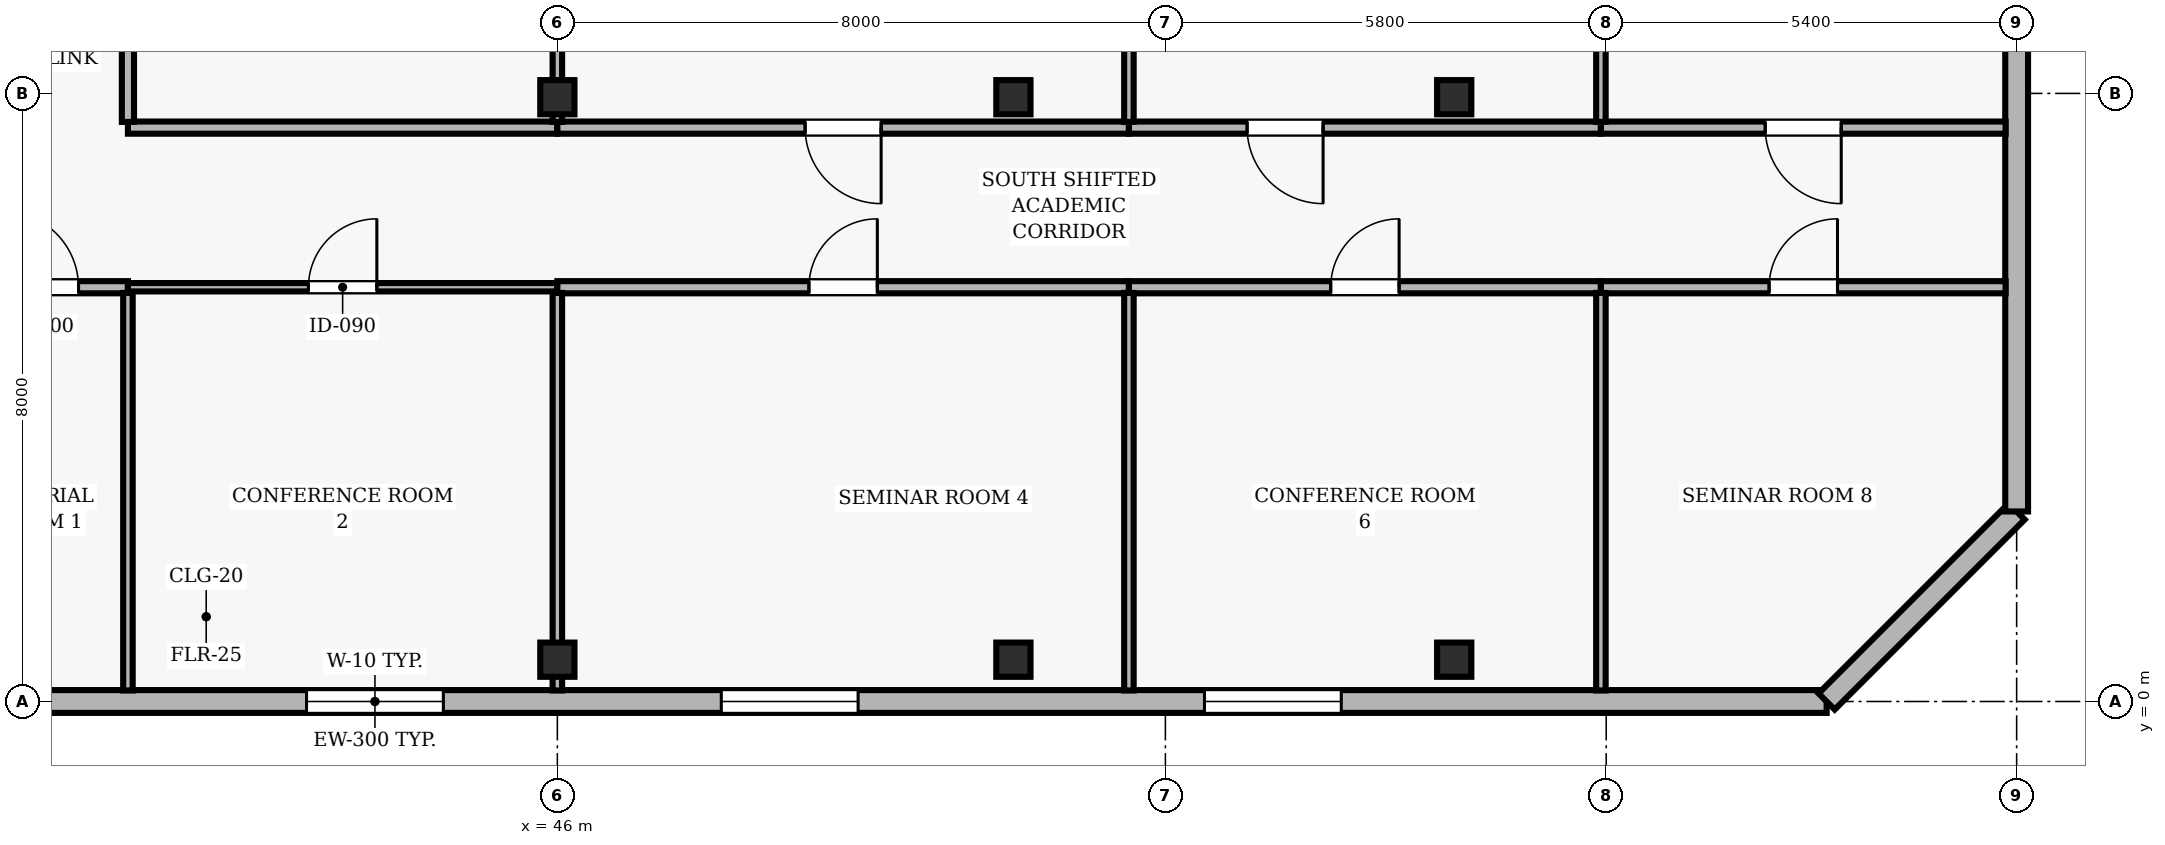
"""IFC4 building model, lengths in metres.
Left out: names, types, materials, properties, quantities, classifications, styles, units other than length and angle.
Written with IfcOpenShell. Run it as: python <this file> out.ifc"""

import sys

from ifc_helpers import new_model, si_unit, direction, frame, frame_2d, origin, origin_2d, place, context, subcontext, project, spatial, rectangle, hollow_rectangle, extrude, element, fill, save


model = new_model("IFC4")
c1 = context("Model", 3, precision=1e-05, world=origin(), true_north=direction((0.0, 1.0)))
c2 = subcontext(c1, "Body", "Model", "MODEL_VIEW")
j1 = project(units=[si_unit("LENGTHUNIT", "METRE"), si_unit("PLANEANGLEUNIT", "RADIAN")], contexts=[c1])
p1 = place(None, origin())
s1 = spatial("IfcSite", under=j1, at=p1, CompositionType="ELEMENT")
p2 = place(p1, origin())
s2 = spatial("IfcBuilding", under=s1, at=p2, CompositionType="ELEMENT")
p3 = place(p2, frame((0.0, 0.0, 234.3)))
s3 = spatial("IfcBuildingStorey", under=s2, at=p3, CompositionType="ELEMENT", Elevation=234.3)
for number, where, z_axis, x_axis in (
    (1, (46.0, 0.55, 0.0), (0.0, 0.0, 1.0), (1.0, 0.0, 0.0)),
    (2, (46.0, 7.95, 0.0), (0.0, 0.0, 1.0), (1.0, 0.0, 0.0)),
    (3, (52.0, 0.55, 0.0), (0.0, 0.0, 1.0), (1.0, 0.0, 0.0)),
    (4, (52.0, 7.95, 0.0), (0.0, 0.0, 1.0), (1.0, 0.0, 0.0)),
    (5, (57.8, 0.55, 0.0), (0.0, 0.0, 1.0), (1.0, 0.0, 0.0)),
    (6, (57.8, 7.95, 0.0), (0.0, 0.0, 1.0), (1.0, 0.0, 0.0)),
):
    element("IfcColumn", number, at=place(p3, frame(where, z_axis=z_axis, x_axis=x_axis)), inside=s3, PredefinedType="COLUMN", context=c2, shape_type="SweptSolid", body=[
        extrude(hollow_rectangle(XDim=0.45, YDim=0.45, WallThickness=0.02, at=origin_2d()), origin(), (0.0, 0.0, 1.0), 3.9),
    ])
p4 = place(p3, frame((24.5, 0.0, 0.0), z_axis=(0.0, 0.0, 1.0), x_axis=(1.0, 0.0, 0.0)))
e7 = element("IfcWall", 7, at=p4, inside=s3, PredefinedType="SOLIDWALL", context=c2, shape_type="SweptSolid", body=[
    extrude(rectangle(XDim=38.2, YDim=0.3, at=frame_2d((19.1, 0.0))), origin(), (0.0, 0.0, 1.0), 3.64),
])
p5 = place(p4, frame((1.829, 0.0, 0.9)))
e8 = element("IfcOpeningElement", 8, at=p5, cuts=e7, PredefinedType="OPENING", context=c2, shape_type="SweptSolid", body=[
    extrude(rectangle(XDim=1.8, YDim=2.2, at=frame_2d((0.9, 1.1))), frame((0.0, 0.16, 0.0), z_axis=(0.0, -1.0, 0.0), x_axis=(1.0, 0.0, 0.0)), (0.0, 0.0, 1.0), 0.32),
])
p6 = place(p4, frame((8.186, 0.0, 0.9)))
e9 = element("IfcOpeningElement", 9, at=p6, cuts=e7, PredefinedType="OPENING", context=c2, shape_type="SweptSolid", body=[
    extrude(rectangle(XDim=1.8, YDim=2.2, at=frame_2d((0.9, 1.1))), frame((0.0, 0.16, 0.0), z_axis=(0.0, -1.0, 0.0), x_axis=(1.0, 0.0, 0.0)), (0.0, 0.0, 1.0), 0.32),
])
p7 = place(p4, frame((18.2, 0.0, 0.9)))
e10 = element("IfcOpeningElement", 10, at=p7, cuts=e7, PredefinedType="OPENING", context=c2, shape_type="SweptSolid", body=[
    extrude(rectangle(XDim=1.8, YDim=2.2, at=frame_2d((0.9, 1.1))), frame((0.0, 0.16, 0.0), z_axis=(0.0, -1.0, 0.0), x_axis=(1.0, 0.0, 0.0)), (0.0, 0.0, 1.0), 0.32),
])
p8 = place(p4, frame((23.657, 0.0, 0.9)))
e11 = element("IfcOpeningElement", 11, at=p8, cuts=e7, PredefinedType="OPENING", context=c2, shape_type="SweptSolid", body=[
    extrude(rectangle(XDim=1.8, YDim=2.2, at=frame_2d((0.9, 1.1))), frame((0.0, 0.16, 0.0), z_axis=(0.0, -1.0, 0.0), x_axis=(1.0, 0.0, 0.0)), (0.0, 0.0, 1.0), 0.32),
])
p9 = place(p4, frame((30.014, 0.0, 0.9)))
e12 = element("IfcOpeningElement", 12, at=p9, cuts=e7, PredefinedType="OPENING", context=c2, shape_type="SweptSolid", body=[
    extrude(rectangle(XDim=1.8, YDim=2.2, at=frame_2d((0.9, 1.1))), frame((0.0, 0.16, 0.0), z_axis=(0.0, -1.0, 0.0), x_axis=(1.0, 0.0, 0.0)), (0.0, 0.0, 1.0), 0.32),
])
p10 = place(p3, frame((62.7, 0.0, 0.0), z_axis=(0.0, 0.0, 1.0), x_axis=(0.707106781187, 0.707106781187, 0.0)))
e13 = element("IfcWall", 13, at=p10, inside=s3, PredefinedType="SOLIDWALL", context=c2, shape_type="SweptSolid", body=[
    extrude(rectangle(XDim=3.536, YDim=0.3, at=frame_2d((1.768, 0.0))), origin(), (0.0, 0.0, 1.0), 3.64),
])
p11 = place(p3, frame((65.2, 2.5, 0.0), z_axis=(0.0, 0.0, 1.0), x_axis=(0.0, 1.0, 0.0)))
e14 = element("IfcWall", 14, at=p11, inside=s3, PredefinedType="SOLIDWALL", context=c2, shape_type="SweptSolid", body=[
    extrude(rectangle(XDim=11.0, YDim=0.3, at=frame_2d((5.5, 0.0))), origin(), (0.0, 0.0, 1.0), 3.64),
])
p12 = place(p11, frame((6.75, 0.0, 0.9)))
e15 = element("IfcOpeningElement", 15, at=p12, cuts=e14, PredefinedType="OPENING", context=c2, shape_type="SweptSolid", body=[
    extrude(rectangle(XDim=3.0, YDim=2.2, at=frame_2d((1.5, 1.1))), frame((0.0, 0.16, 0.0), z_axis=(0.0, -1.0, 0.0), x_axis=(1.0, 0.0, 0.0)), (0.0, 0.0, 1.0), 0.32),
])
p13 = place(p3, frame((38.05, 5.45, 0.0), z_axis=(0.0, 0.0, 1.0), x_axis=(1.0, 0.0, 0.0)))
e16 = element("IfcWall", 16, at=p13, inside=s3, PredefinedType="PARTITIONING", context=c2, shape_type="SweptSolid", body=[
    extrude(rectangle(XDim=2.3, YDim=0.16, at=frame_2d((1.15, 0.0))), origin(), (0.0, 0.0, 1.0), 3.322),
])
p14 = place(p13, frame((0.65, 0.0, 0.0)))
e17 = element("IfcOpeningElement", 17, at=p14, cuts=e16, PredefinedType="OPENING", context=c2, shape_type="SweptSolid", body=[
    extrude(rectangle(XDim=1.0, YDim=2.1, at=frame_2d((0.5, 1.05))), frame((0.0, 0.09, 0.0), z_axis=(0.0, -1.0, 0.0), x_axis=(1.0, 0.0, 0.0)), (0.0, 0.0, 1.0), 0.18),
])
p15 = place(p3, frame((40.35, 5.45, 0.0), z_axis=(0.0, 0.0, 1.0), x_axis=(1.0, 0.0, 0.0)))
e18 = element("IfcWall", 18, at=p15, inside=s3, PredefinedType="MOVABLE", context=c2, shape_type="SweptSolid", body=[
    extrude(rectangle(XDim=5.65, YDim=0.11, at=frame_2d((2.825, 0.0))), origin(), (0.0, 0.0, 1.0), 3.322),
])
p16 = place(p15, frame((2.375, 0.0, 0.0)))
e19 = element("IfcOpeningElement", 19, at=p16, cuts=e18, PredefinedType="OPENING", context=c2, shape_type="SweptSolid", body=[
    extrude(rectangle(XDim=0.9, YDim=2.1, at=frame_2d((0.45, 1.05))), frame((0.0, 0.065, 0.0), z_axis=(0.0, -1.0, 0.0), x_axis=(1.0, 0.0, 0.0)), (0.0, 0.0, 1.0), 0.13),
])
p17 = place(p3, frame((46.0, 5.45, 0.0), z_axis=(0.0, 0.0, 1.0), x_axis=(1.0, 0.0, 0.0)))
e20 = element("IfcWall", 20, at=p17, inside=s3, PredefinedType="PARTITIONING", context=c2, shape_type="SweptSolid", body=[
    extrude(rectangle(XDim=7.52, YDim=0.16, at=frame_2d((3.76, 0.0))), origin(), (0.0, 0.0, 1.0), 3.322),
])
p18 = place(p17, frame((3.31, 0.0, 0.0)))
e21 = element("IfcOpeningElement", 21, at=p18, cuts=e20, PredefinedType="OPENING", context=c2, shape_type="SweptSolid", body=[
    extrude(rectangle(XDim=0.9, YDim=2.1, at=frame_2d((0.45, 1.05))), frame((0.0, 0.09, 0.0), z_axis=(0.0, -1.0, 0.0), x_axis=(1.0, 0.0, 0.0)), (0.0, 0.0, 1.0), 0.18),
])
p19 = place(p3, frame((46.0, 7.55, 0.0), z_axis=(0.0, 0.0, 1.0), x_axis=(-1.0, 0.0, 0.0)))
e22 = element("IfcWall", 22, at=p19, inside=s3, PredefinedType="PARTITIONING", context=c2, shape_type="SweptSolid", body=[
    extrude(rectangle(XDim=5.65, YDim=0.16, at=frame_2d((2.825, 0.0))), origin(), (0.0, 0.0, 1.0), 3.096),
])
p20 = place(p3, frame((53.52, 5.45, 0.0), z_axis=(0.0, 0.0, 1.0), x_axis=(1.0, 0.0, 0.0)))
e23 = element("IfcWall", 23, at=p20, inside=s3, PredefinedType="PARTITIONING", context=c2, shape_type="SweptSolid", body=[
    extrude(rectangle(XDim=6.21, YDim=0.16, at=frame_2d((3.105, 0.0))), origin(), (0.0, 0.0, 1.0), 3.322),
])
p21 = place(p20, frame((2.655, 0.0, 0.0)))
e24 = element("IfcOpeningElement", 24, at=p21, cuts=e23, PredefinedType="OPENING", context=c2, shape_type="SweptSolid", body=[
    extrude(rectangle(XDim=0.9, YDim=2.1, at=frame_2d((0.45, 1.05))), frame((0.0, 0.09, 0.0), z_axis=(0.0, -1.0, 0.0), x_axis=(1.0, 0.0, 0.0)), (0.0, 0.0, 1.0), 0.18),
])
p22 = place(p3, frame((53.52, 7.55, 0.0), z_axis=(0.0, 0.0, 1.0), x_axis=(-1.0, 0.0, 0.0)))
e25 = element("IfcWall", 25, at=p22, inside=s3, PredefinedType="PARTITIONING", context=c2, shape_type="SweptSolid", body=[
    extrude(rectangle(XDim=7.52, YDim=0.16, at=frame_2d((3.76, 0.0))), origin(), (0.0, 0.0, 1.0), 3.096),
])
p23 = place(p22, frame((3.26, 0.0, 0.0)))
e26 = element("IfcOpeningElement", 26, at=p23, cuts=e25, PredefinedType="OPENING", context=c2, shape_type="SweptSolid", body=[
    extrude(rectangle(XDim=1.0, YDim=2.1, at=frame_2d((0.5, 1.05))), frame((0.0, 0.09, 0.0), z_axis=(0.0, -1.0, 0.0), x_axis=(1.0, 0.0, 0.0)), (0.0, 0.0, 1.0), 0.18),
])
p24 = place(p3, frame((59.73, 5.45, 0.0), z_axis=(0.0, 0.0, 1.0), x_axis=(1.0, 0.0, 0.0)))
e27 = element("IfcWall", 27, at=p24, inside=s3, PredefinedType="PARTITIONING", context=c2, shape_type="SweptSolid", body=[
    extrude(rectangle(XDim=5.325, YDim=0.16, at=frame_2d((2.663, 0.0))), origin(), (0.0, 0.0, 1.0), 3.64),
])
p25 = place(p24, frame((2.213, 0.0, 0.0)))
e28 = element("IfcOpeningElement", 28, at=p25, cuts=e27, PredefinedType="OPENING", context=c2, shape_type="SweptSolid", body=[
    extrude(rectangle(XDim=0.9, YDim=2.1, at=frame_2d((0.45, 1.05))), frame((0.0, 0.09, 0.0), z_axis=(0.0, -1.0, 0.0), x_axis=(1.0, 0.0, 0.0)), (0.0, 0.0, 1.0), 0.18),
])
p26 = place(p3, frame((59.73, 7.55, 0.0), z_axis=(0.0, 0.0, 1.0), x_axis=(-1.0, 0.0, 0.0)))
e29 = element("IfcWall", 29, at=p26, inside=s3, PredefinedType="PARTITIONING", context=c2, shape_type="SweptSolid", body=[
    extrude(rectangle(XDim=6.21, YDim=0.16, at=frame_2d((3.105, 0.0))), origin(), (0.0, 0.0, 1.0), 3.096),
])
p27 = place(p26, frame((3.655, 0.0, 0.0)))
e30 = element("IfcOpeningElement", 30, at=p27, cuts=e29, PredefinedType="OPENING", context=c2, shape_type="SweptSolid", body=[
    extrude(rectangle(XDim=1.0, YDim=2.1, at=frame_2d((0.5, 1.05))), frame((0.0, 0.09, 0.0), z_axis=(0.0, -1.0, 0.0), x_axis=(1.0, 0.0, 0.0)), (0.0, 0.0, 1.0), 0.18),
])
p28 = place(p3, frame((65.055, 7.55, 0.0), z_axis=(0.0, 0.0, 1.0), x_axis=(-1.0, 0.0, 0.0)))
e31 = element("IfcWall", 31, at=p28, inside=s3, PredefinedType="PARTITIONING", context=c2, shape_type="SweptSolid", body=[
    extrude(rectangle(XDim=5.325, YDim=0.16, at=frame_2d((2.663, 0.0))), origin(), (0.0, 0.0, 1.0), 3.64),
])
p29 = place(p28, frame((2.163, 0.0, 0.0)))
e32 = element("IfcOpeningElement", 32, at=p29, cuts=e31, PredefinedType="OPENING", context=c2, shape_type="SweptSolid", body=[
    extrude(rectangle(XDim=1.0, YDim=2.1, at=frame_2d((0.5, 1.05))), frame((0.0, 0.09, 0.0), z_axis=(0.0, -1.0, 0.0), x_axis=(1.0, 0.0, 0.0)), (0.0, 0.0, 1.0), 0.18),
])
p30 = place(p3, frame((40.35, 0.145, 0.0), z_axis=(0.0, 0.0, 1.0), x_axis=(0.0, 1.0, 0.0)))
e33 = element("IfcWall", 33, at=p30, inside=s3, PredefinedType="PARTITIONING", context=c2, shape_type="SweptSolid", body=[
    extrude(rectangle(XDim=5.23, YDim=0.125, at=frame_2d((2.615, 0.0))), origin(), (0.0, 0.0, 1.0), 3.64),
])
p31 = place(p3, frame((40.35, 7.625, 0.0), z_axis=(0.0, 0.0, 1.0), x_axis=(0.0, 1.0, 0.0)))
e34 = element("IfcWall", 34, at=p31, inside=s3, PredefinedType="PARTITIONING", context=c2, shape_type="SweptSolid", body=[
    extrude(rectangle(XDim=8.3, YDim=0.16, at=frame_2d((4.15, 0.0))), origin(), (0.0, 0.0, 1.0), 3.64),
])
p32 = place(p31, frame((3.65, 0.0, 0.0)))
e35 = element("IfcOpeningElement", 35, at=p32, cuts=e34, PredefinedType="OPENING", context=c2, shape_type="SweptSolid", body=[
    extrude(rectangle(XDim=1.0, YDim=2.1, at=frame_2d((0.5, 1.05))), frame((0.0, 0.09, 0.0), z_axis=(0.0, -1.0, 0.0), x_axis=(1.0, 0.0, 0.0)), (0.0, 0.0, 1.0), 0.18),
])
p33 = place(p3, frame((46.0, 0.145, 0.0), z_axis=(0.0, 0.0, 1.0), x_axis=(0.0, 1.0, 0.0)))
e36 = element("IfcWall", 36, at=p33, inside=s3, PredefinedType="PARTITIONING", context=c2, shape_type="SweptSolid", body=[
    extrude(rectangle(XDim=5.23, YDim=0.125, at=frame_2d((2.615, 0.0))), origin(), (0.0, 0.0, 1.0), 3.096),
])
p34 = place(p3, frame((46.0, 7.625, 0.0), z_axis=(0.0, 0.0, 1.0), x_axis=(0.0, 1.0, 0.0)))
e37 = element("IfcWall", 37, at=p34, inside=s3, PredefinedType="PARTITIONING", context=c2, shape_type="SweptSolid", body=[
    extrude(rectangle(XDim=8.23, YDim=0.125, at=frame_2d((4.115, 0.0))), origin(), (0.0, 0.0, 1.0), 3.096),
])
p35 = place(p3, frame((53.52, 0.145, 0.0), z_axis=(0.0, 0.0, 1.0), x_axis=(0.0, 1.0, 0.0)))
e38 = element("IfcWall", 38, at=p35, inside=s3, PredefinedType="PARTITIONING", context=c2, shape_type="SweptSolid", body=[
    extrude(rectangle(XDim=5.23, YDim=0.125, at=frame_2d((2.615, 0.0))), origin(), (0.0, 0.0, 1.0), 3.64),
])
p36 = place(p3, frame((53.52, 7.625, 0.0), z_axis=(0.0, 0.0, 1.0), x_axis=(0.0, 1.0, 0.0)))
e39 = element("IfcWall", 39, at=p36, inside=s3, PredefinedType="PARTITIONING", context=c2, shape_type="SweptSolid", body=[
    extrude(rectangle(XDim=8.23, YDim=0.125, at=frame_2d((4.115, 0.0))), origin(), (0.0, 0.0, 1.0), 3.64),
])
p37 = place(p3, frame((59.73, 0.145, 0.0), z_axis=(0.0, 0.0, 1.0), x_axis=(0.0, 1.0, 0.0)))
e40 = element("IfcWall", 40, at=p37, inside=s3, PredefinedType="PARTITIONING", context=c2, shape_type="SweptSolid", body=[
    extrude(rectangle(XDim=5.23, YDim=0.125, at=frame_2d((2.615, 0.0))), origin(), (0.0, 0.0, 1.0), 3.64),
])
p38 = place(p3, frame((59.73, 7.625, 0.0), z_axis=(0.0, 0.0, 1.0), x_axis=(0.0, 1.0, 0.0)))
e41 = element("IfcWall", 41, at=p38, inside=s3, PredefinedType="PARTITIONING", context=c2, shape_type="SweptSolid", body=[
    extrude(rectangle(XDim=8.23, YDim=0.125, at=frame_2d((4.115, 0.0))), origin(), (0.0, 0.0, 1.0), 3.64),
])
p39 = place(p7, origin())
e42 = element("IfcWindow", 42, at=p39, inside=s3, PartitioningType="SINGLE_PANEL", PredefinedType="WINDOW", context=c2, shape_type="SweptSolid", body=[
    extrude(rectangle(XDim=1.8, YDim=2.2, at=frame_2d((0.9, 1.1))), frame((0.0, 0.03, 0.0), z_axis=(0.0, -1.0, 0.0), x_axis=(1.0, 0.0, 0.0)), (0.0, 0.0, 1.0), 0.06),
])
fill(e10, e42)
p40 = place(p8, origin())
e43 = element("IfcWindow", 43, at=p40, inside=s3, PartitioningType="SINGLE_PANEL", PredefinedType="WINDOW", context=c2, shape_type="SweptSolid", body=[
    extrude(rectangle(XDim=1.8, YDim=2.2, at=frame_2d((0.9, 1.1))), frame((0.0, 0.03, 0.0), z_axis=(0.0, -1.0, 0.0), x_axis=(1.0, 0.0, 0.0)), (0.0, 0.0, 1.0), 0.06),
])
fill(e11, e43)
p41 = place(p9, origin())
e44 = element("IfcWindow", 44, at=p41, inside=s3, PartitioningType="SINGLE_PANEL", PredefinedType="WINDOW", context=c2, shape_type="SweptSolid", body=[
    extrude(rectangle(XDim=1.8, YDim=2.2, at=frame_2d((0.9, 1.1))), frame((0.0, 0.03, 0.0), z_axis=(0.0, -1.0, 0.0), x_axis=(1.0, 0.0, 0.0)), (0.0, 0.0, 1.0), 0.06),
])
fill(e12, e44)
p42 = place(p14, origin())
e45 = element("IfcDoor", 45, at=p42, inside=s3, OperationType="SINGLE_SWING_LEFT", PredefinedType="DOOR", context=c2, shape_type="SweptSolid", body=[
    extrude(rectangle(XDim=1.0, YDim=2.1, at=frame_2d((0.5, 1.05))), frame((0.0, 0.025, 0.0), z_axis=(0.0, -1.0, 0.0), x_axis=(1.0, 0.0, 0.0)), (0.0, 0.0, 1.0), 0.05),
])
fill(e17, e45)
p43 = place(p16, origin())
e46 = element("IfcDoor", 46, at=p43, inside=s3, OperationType="SINGLE_SWING_RIGHT", PredefinedType="DOOR", context=c2, shape_type="SweptSolid", body=[
    extrude(rectangle(XDim=0.9, YDim=2.1, at=frame_2d((0.45, 1.05))), frame((0.0, 0.025, 0.0), z_axis=(0.0, -1.0, 0.0), x_axis=(1.0, 0.0, 0.0)), (0.0, 0.0, 1.0), 0.05),
])
fill(e19, e46)
p44 = place(p18, origin())
e47 = element("IfcDoor", 47, at=p44, inside=s3, OperationType="SINGLE_SWING_RIGHT", PredefinedType="DOOR", context=c2, shape_type="SweptSolid", body=[
    extrude(rectangle(XDim=0.9, YDim=2.1, at=frame_2d((0.45, 1.05))), frame((0.0, 0.025, 0.0), z_axis=(0.0, -1.0, 0.0), x_axis=(1.0, 0.0, 0.0)), (0.0, 0.0, 1.0), 0.05),
])
fill(e21, e47)
p45 = place(p23, origin())
e48 = element("IfcDoor", 48, at=p45, inside=s3, OperationType="SINGLE_SWING_LEFT", PredefinedType="DOOR", context=c2, shape_type="SweptSolid", body=[
    extrude(rectangle(XDim=1.0, YDim=2.1, at=frame_2d((0.5, 1.05))), frame((0.0, 0.025, 0.0), z_axis=(0.0, -1.0, 0.0), x_axis=(1.0, 0.0, 0.0)), (0.0, 0.0, 1.0), 0.05),
])
fill(e26, e48)
p46 = place(p21, origin())
e49 = element("IfcDoor", 49, at=p46, inside=s3, OperationType="SINGLE_SWING_RIGHT", PredefinedType="DOOR", context=c2, shape_type="SweptSolid", body=[
    extrude(rectangle(XDim=0.9, YDim=2.1, at=frame_2d((0.45, 1.05))), frame((0.0, 0.025, 0.0), z_axis=(0.0, -1.0, 0.0), x_axis=(1.0, 0.0, 0.0)), (0.0, 0.0, 1.0), 0.05),
])
fill(e24, e49)
p47 = place(p27, origin())
e50 = element("IfcDoor", 50, at=p47, inside=s3, OperationType="SINGLE_SWING_LEFT", PredefinedType="DOOR", context=c2, shape_type="SweptSolid", body=[
    extrude(rectangle(XDim=1.0, YDim=2.1, at=frame_2d((0.5, 1.05))), frame((0.0, 0.025, 0.0), z_axis=(0.0, -1.0, 0.0), x_axis=(1.0, 0.0, 0.0)), (0.0, 0.0, 1.0), 0.05),
])
fill(e30, e50)
p48 = place(p25, origin())
e51 = element("IfcDoor", 51, at=p48, inside=s3, OperationType="SINGLE_SWING_RIGHT", PredefinedType="DOOR", context=c2, shape_type="SweptSolid", body=[
    extrude(rectangle(XDim=0.9, YDim=2.1, at=frame_2d((0.45, 1.05))), frame((0.0, 0.025, 0.0), z_axis=(0.0, -1.0, 0.0), x_axis=(1.0, 0.0, 0.0)), (0.0, 0.0, 1.0), 0.05),
])
fill(e28, e51)
p49 = place(p29, origin())
e52 = element("IfcDoor", 52, at=p49, inside=s3, OperationType="SINGLE_SWING_LEFT", PredefinedType="DOOR", context=c2, shape_type="SweptSolid", body=[
    extrude(rectangle(XDim=1.0, YDim=2.1, at=frame_2d((0.5, 1.05))), frame((0.0, 0.025, 0.0), z_axis=(0.0, -1.0, 0.0), x_axis=(1.0, 0.0, 0.0)), (0.0, 0.0, 1.0), 0.05),
])
fill(e32, e52)
save(model, sys.argv[1])
